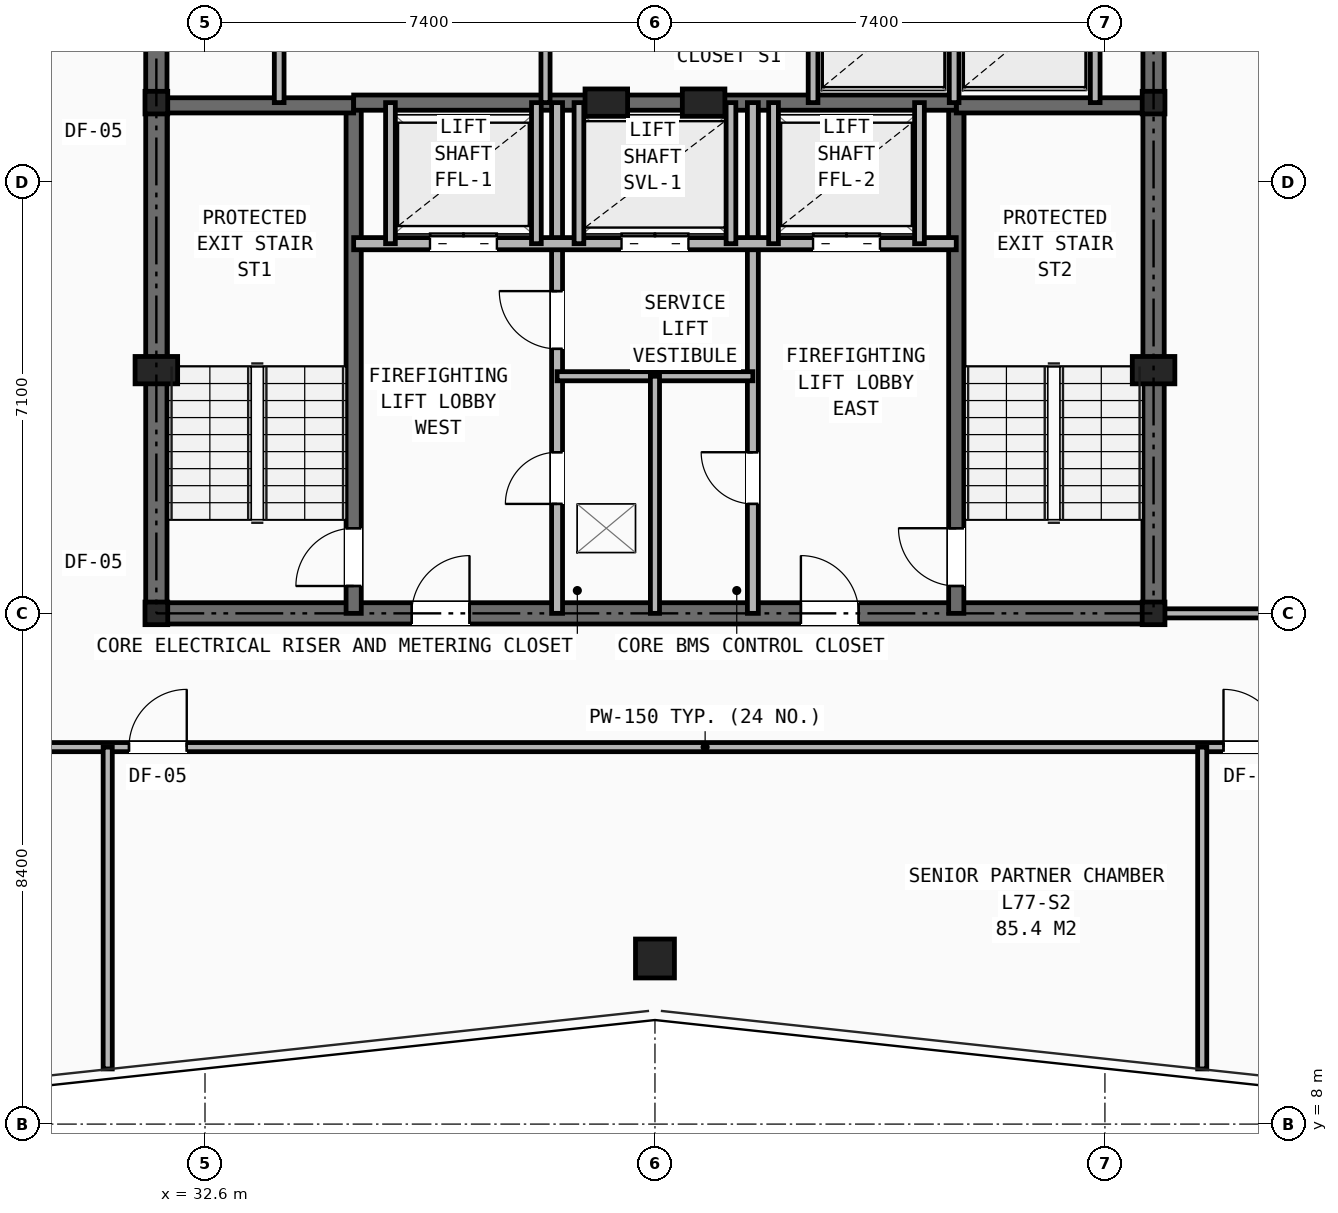
"""IFC4 building model, lengths in metres.
Left out: names, types, materials, properties, quantities, classifications, styles, units other than length and angle.
Written with IfcOpenShell. Run it as: python <this file> out.ifc"""

import sys

from ifc_helpers import new_model, si_unit, direction, frame, frame_2d, origin, origin_2d, place, context, subcontext, project, spatial, rectangle, hollow_rectangle, i_section, extrude, element, fill, save


model = new_model("IFC4")
c1 = context("Model", 3, precision=1e-05, world=origin(), true_north=direction((0.0, 1.0)))
c2 = subcontext(c1, "Body", "Model", "MODEL_VIEW")
j1 = project(units=[si_unit("LENGTHUNIT", "METRE"), si_unit("PLANEANGLEUNIT", "RADIAN")], contexts=[c1])
p1 = place(None, origin())
s1 = spatial("IfcSite", under=j1, at=p1, CompositionType="ELEMENT")
p2 = place(p1, origin())
s2 = spatial("IfcBuilding", under=s1, at=p2, CompositionType="ELEMENT")
p3 = place(p2, frame((0.0, 0.0, 272.5)))
s3 = spatial("IfcBuildingStorey", under=s2, at=p3, CompositionType="ELEMENT", Elevation=272.5)
for number, where, z_axis, x_axis in (
    (1, (31.8, 16.4, 0.0), (0.0, 0.0, 1.0), (1.0, 0.0, 0.0)),
    (2, (48.2, 16.4, 0.0), (0.0, 0.0, 1.0), (1.0, 0.0, 0.0)),
    (3, (31.8, 24.8, 0.0), (0.0, 0.0, 1.0), (1.0, 0.0, 0.0)),
    (4, (48.2, 24.8, 0.0), (0.0, 0.0, 1.0), (1.0, 0.0, 0.0)),
):
    element("IfcColumn", number, at=place(p3, frame(where, z_axis=z_axis, x_axis=x_axis)), inside=s3, PredefinedType="COLUMN", context=c2, shape_type="SweptSolid", body=[
        extrude(i_section(OverallWidth=0.374, OverallDepth=0.372, WebThickness=0.016, FlangeThickness=0.026, at=origin_2d()), origin(), (0.0, 0.0, 1.0), 3.5),
    ])
for number, where, z_axis, x_axis in (
    (5, (31.8, 20.4, 0.0), (0.0, 0.0, 1.0), (1.0, 0.0, 0.0)),
    (6, (48.2, 20.4, 0.0), (0.0, 0.0, 1.0), (1.0, 0.0, 0.0)),
    (7, (39.2, 24.8, 0.0), (0.0, 0.0, 1.0), (1.0, 0.0, 0.0)),
    (8, (40.8, 24.8, 0.0), (0.0, 0.0, 1.0), (1.0, 0.0, 0.0)),
):
    element("IfcColumn", number, at=place(p3, frame(where, z_axis=z_axis, x_axis=x_axis)), inside=s3, PredefinedType="PILASTER", context=c2, shape_type="SweptSolid", body=[
        extrude(rectangle(XDim=0.7, YDim=0.45, at=origin_2d()), origin(), (0.0, 0.0, 1.0), 3.5),
    ])
p4 = place(p3, frame((40.0, 10.724, 0.0), z_axis=(0.0, 0.0, 1.0), x_axis=(1.0, 0.0, 0.0)))
e9 = element("IfcColumn", 9, at=p4, inside=s3, PredefinedType="COLUMN", context=c2, shape_type="SweptSolid", body=[
    extrude(hollow_rectangle(XDim=0.64, YDim=0.64, WallThickness=0.045, at=origin_2d()), origin(), (0.0, 0.0, 1.0), 3.5),
])
p5 = place(p3, frame((31.8, 16.4, 0.0), z_axis=(0.0, 0.0, 1.0), x_axis=(1.0, 0.0, 0.0)))
e10 = element("IfcWall", 10, at=p5, inside=s3, PredefinedType="SHEAR", context=c2, shape_type="SweptSolid", body=[
    extrude(rectangle(XDim=16.4, YDim=0.35, at=frame_2d((8.2, 0.0))), origin(), (0.0, 0.0, 1.0), 3.25),
])
p6 = place(p5, frame((4.2, 0.0, 0.0)))
e11 = element("IfcOpeningElement", 11, at=p6, cuts=e10, PredefinedType="OPENING", context=c2, shape_type="SweptSolid", body=[
    extrude(rectangle(XDim=0.95, YDim=2.1, at=frame_2d((0.475, 1.05))), frame((0.0, 0.185, 0.0), z_axis=(0.0, -1.0, 0.0), x_axis=(1.0, 0.0, 0.0)), (0.0, 0.0, 1.0), 0.37),
])
p7 = place(p5, frame((10.6, 0.0, 0.0)))
e12 = element("IfcOpeningElement", 12, at=p7, cuts=e10, PredefinedType="OPENING", context=c2, shape_type="SweptSolid", body=[
    extrude(rectangle(XDim=0.95, YDim=2.1, at=frame_2d((0.475, 1.05))), frame((0.0, 0.185, 0.0), z_axis=(0.0, -1.0, 0.0), x_axis=(1.0, 0.0, 0.0)), (0.0, 0.0, 1.0), 0.37),
])
p8 = place(p3, frame((31.8, 16.4, 0.0), z_axis=(0.0, 0.0, 1.0), x_axis=(0.0, 1.0, 0.0)))
e13 = element("IfcWall", 13, at=p8, inside=s3, PredefinedType="SHEAR", context=c2, shape_type="SweptSolid", body=[
    extrude(rectangle(XDim=14.8, YDim=0.35, at=frame_2d((7.4, 0.0))), origin(), (0.0, 0.0, 1.0), 3.25),
])
p9 = place(p8, frame((11.0, 0.0, 0.0)))
e14 = element("IfcOpeningElement", 14, at=p9, cuts=e13, PredefinedType="OPENING", context=c2, shape_type="SweptSolid", body=[
    extrude(rectangle(XDim=1.1, YDim=2.15, at=frame_2d((0.55, 1.075))), frame((0.0, 0.185, 0.0), z_axis=(0.0, -1.0, 0.0), x_axis=(1.0, 0.0, 0.0)), (0.0, 0.0, 1.0), 0.37),
])
p10 = place(p3, frame((48.2, 16.4, 0.0), z_axis=(0.0, 0.0, 1.0), x_axis=(0.0, 1.0, 0.0)))
e15 = element("IfcWall", 15, at=p10, inside=s3, PredefinedType="SHEAR", context=c2, shape_type="SweptSolid", body=[
    extrude(rectangle(XDim=14.8, YDim=0.35, at=frame_2d((7.4, 0.0))), origin(), (0.0, 0.0, 1.0), 3.25),
])
p11 = place(p10, frame((11.0, 0.0, 0.0)))
e16 = element("IfcOpeningElement", 16, at=p11, cuts=e15, PredefinedType="OPENING", context=c2, shape_type="SweptSolid", body=[
    extrude(rectangle(XDim=1.1, YDim=2.15, at=frame_2d((0.55, 1.075))), frame((0.0, 0.185, 0.0), z_axis=(0.0, -1.0, 0.0), x_axis=(1.0, 0.0, 0.0)), (0.0, 0.0, 1.0), 0.37),
])
p12 = place(p3, frame((35.045, 16.4, 0.0), z_axis=(0.0, 0.0, 1.0), x_axis=(0.0, 1.0, 0.0)))
e17 = element("IfcWall", 17, at=p12, inside=s3, PredefinedType="SHEAR", context=c2, shape_type="SweptSolid", body=[
    extrude(rectangle(XDim=8.4, YDim=0.25, at=frame_2d((4.2, 0.0))), origin(), (0.0, 0.0, 1.0), 3.25),
])
p13 = place(p12, frame((0.45, 0.0, 0.0)))
e18 = element("IfcOpeningElement", 18, at=p13, cuts=e17, PredefinedType="OPENING", context=c2, shape_type="SweptSolid", body=[
    extrude(rectangle(XDim=0.95, YDim=2.1, at=frame_2d((0.475, 1.05))), frame((0.0, 0.135, 0.0), z_axis=(0.0, -1.0, 0.0), x_axis=(1.0, 0.0, 0.0)), (0.0, 0.0, 1.0), 0.27),
])
p14 = place(p3, frame((31.8, 24.755, 0.0), z_axis=(0.0, 0.0, 1.0), x_axis=(1.0, 0.0, 0.0)))
e19 = element("IfcWall", 19, at=p14, inside=s3, PredefinedType="SHEAR", context=c2, shape_type="SweptSolid", body=[
    extrude(rectangle(XDim=3.245, YDim=0.25, at=frame_2d((1.623, 0.0))), origin(), (0.0, 0.0, 1.0), 3.25),
])
p15 = place(p3, frame((44.955, 16.4, 0.0), z_axis=(0.0, 0.0, 1.0), x_axis=(0.0, 1.0, 0.0)))
e20 = element("IfcWall", 20, at=p15, inside=s3, PredefinedType="SHEAR", context=c2, shape_type="SweptSolid", body=[
    extrude(rectangle(XDim=8.4, YDim=0.25, at=frame_2d((4.2, 0.0))), origin(), (0.0, 0.0, 1.0), 3.25),
])
p16 = place(p15, frame((0.45, 0.0, 0.0)))
e21 = element("IfcOpeningElement", 21, at=p16, cuts=e20, PredefinedType="OPENING", context=c2, shape_type="SweptSolid", body=[
    extrude(rectangle(XDim=0.95, YDim=2.1, at=frame_2d((0.475, 1.05))), frame((0.0, 0.135, 0.0), z_axis=(0.0, -1.0, 0.0), x_axis=(1.0, 0.0, 0.0)), (0.0, 0.0, 1.0), 0.27),
])
p17 = place(p3, frame((44.955, 24.755, 0.0), z_axis=(0.0, 0.0, 1.0), x_axis=(1.0, 0.0, 0.0)))
e22 = element("IfcWall", 22, at=p17, inside=s3, PredefinedType="SHEAR", context=c2, shape_type="SweptSolid", body=[
    extrude(rectangle(XDim=3.245, YDim=0.25, at=frame_2d((1.623, 0.0))), origin(), (0.0, 0.0, 1.0), 3.25),
])
p18 = place(p3, frame((35.045, 24.8, 0.0), z_axis=(0.0, 0.0, 1.0), x_axis=(1.0, 0.0, 0.0)))
e23 = element("IfcWall", 23, at=p18, inside=s3, PredefinedType="SHEAR", context=c2, shape_type="SweptSolid", body=[
    extrude(rectangle(XDim=9.91, YDim=0.25, at=frame_2d((4.955, 0.0))), origin(), (0.0, 0.0, 1.0), 3.25),
])
p19 = place(p3, frame((38.39, 16.4, 0.0), z_axis=(0.0, 0.0, 1.0), x_axis=(0.0, 1.0, 0.0)))
e24 = element("IfcWall", 24, at=p19, inside=s3, PredefinedType="PARTITIONING", context=c2, shape_type="SweptSolid", body=[
    extrude(rectangle(XDim=8.4, YDim=0.18, at=frame_2d((4.2, 0.0))), origin(), (0.0, 0.0, 1.0), 2.705),
])
p20 = place(p19, frame((1.8, 0.0, 0.0)))
e25 = element("IfcOpeningElement", 25, at=p20, cuts=e24, PredefinedType="OPENING", context=c2, shape_type="SweptSolid", body=[
    extrude(rectangle(XDim=0.85, YDim=2.05, at=frame_2d((0.425, 1.025))), frame((0.0, 0.1, 0.0), z_axis=(0.0, -1.0, 0.0), x_axis=(1.0, 0.0, 0.0)), (0.0, 0.0, 1.0), 0.2),
])
p21 = place(p19, frame((4.35, 0.0, 0.0)))
e26 = element("IfcOpeningElement", 26, at=p21, cuts=e24, PredefinedType="OPENING", context=c2, shape_type="SweptSolid", body=[
    extrude(rectangle(XDim=0.95, YDim=2.1, at=frame_2d((0.475, 1.05))), frame((0.0, 0.1, 0.0), z_axis=(0.0, -1.0, 0.0), x_axis=(1.0, 0.0, 0.0)), (0.0, 0.0, 1.0), 0.2),
])
p22 = place(p3, frame((41.61, 16.4, 0.0), z_axis=(0.0, 0.0, 1.0), x_axis=(0.0, 1.0, 0.0)))
e27 = element("IfcWall", 27, at=p22, inside=s3, PredefinedType="PARTITIONING", context=c2, shape_type="SweptSolid", body=[
    extrude(rectangle(XDim=8.4, YDim=0.18, at=frame_2d((4.2, 0.0))), origin(), (0.0, 0.0, 1.0), 2.705),
])
p23 = place(p22, frame((1.8, 0.0, 0.0)))
e28 = element("IfcOpeningElement", 28, at=p23, cuts=e27, PredefinedType="OPENING", context=c2, shape_type="SweptSolid", body=[
    extrude(rectangle(XDim=0.85, YDim=2.05, at=frame_2d((0.425, 1.025))), frame((0.0, 0.1, 0.0), z_axis=(0.0, -1.0, 0.0), x_axis=(1.0, 0.0, 0.0)), (0.0, 0.0, 1.0), 0.2),
])
p24 = place(p3, frame((35.045, 22.48, 0.0), z_axis=(0.0, 0.0, 1.0), x_axis=(1.0, 0.0, 0.0)))
e29 = element("IfcWall", 29, at=p24, inside=s3, PredefinedType="SOLIDWALL", context=c2, shape_type="SweptSolid", body=[
    extrude(rectangle(XDim=9.91, YDim=0.2, at=frame_2d((4.955, 0.0))), origin(), (0.0, 0.0, 1.0), 3.25),
])
p25 = place(p24, frame((1.255, 0.0, 0.0)))
e30 = element("IfcOpeningElement", 30, at=p25, cuts=e29, PredefinedType="OPENING", context=c2, shape_type="SweptSolid", body=[
    extrude(rectangle(XDim=1.1, YDim=2.15, at=frame_2d((0.55, 1.075))), frame((0.0, 0.11, 0.0), z_axis=(0.0, -1.0, 0.0), x_axis=(1.0, 0.0, 0.0)), (0.0, 0.0, 1.0), 0.22),
])
p26 = place(p24, frame((7.555, 0.0, 0.0)))
e31 = element("IfcOpeningElement", 31, at=p26, cuts=e29, PredefinedType="OPENING", context=c2, shape_type="SweptSolid", body=[
    extrude(rectangle(XDim=1.1, YDim=2.15, at=frame_2d((0.55, 1.075))), frame((0.0, 0.11, 0.0), z_axis=(0.0, -1.0, 0.0), x_axis=(1.0, 0.0, 0.0)), (0.0, 0.0, 1.0), 0.22),
])
p27 = place(p24, frame((4.405, 0.0, 0.0)))
e32 = element("IfcOpeningElement", 32, at=p27, cuts=e29, PredefinedType="OPENING", context=c2, shape_type="SweptSolid", body=[
    extrude(rectangle(XDim=1.1, YDim=2.15, at=frame_2d((0.55, 1.075))), frame((0.0, 0.11, 0.0), z_axis=(0.0, -1.0, 0.0), x_axis=(1.0, 0.0, 0.0)), (0.0, 0.0, 1.0), 0.22),
])
p28 = place(p3, frame((38.39, 20.3, 0.0), z_axis=(0.0, 0.0, 1.0), x_axis=(1.0, 0.0, 0.0)))
e33 = element("IfcWall", 33, at=p28, inside=s3, PredefinedType="PARTITIONING", context=c2, shape_type="SweptSolid", body=[
    extrude(rectangle(XDim=3.22, YDim=0.15, at=frame_2d((1.61, 0.0))), origin(), (0.0, 0.0, 1.0), 3.25),
])
p29 = place(p3, frame((40.0, 16.4, 0.0), z_axis=(0.0, 0.0, 1.0), x_axis=(0.0, 1.0, 0.0)))
e34 = element("IfcWall", 34, at=p29, inside=s3, PredefinedType="PARTITIONING", context=c2, shape_type="SweptSolid", body=[
    extrude(rectangle(XDim=3.9, YDim=0.15, at=frame_2d((1.95, 0.0))), origin(), (0.0, 0.0, 1.0), 2.705),
])
for number, where, z_axis, x_axis in (
    (35, (35.65, 22.48, 0.0), (0.0, 0.0, 1.0), (0.0, 1.0, 0.0)),
    (36, (38.05, 22.48, 0.0), (0.0, 0.0, 1.0), (0.0, 1.0, 0.0)),
    (37, (41.95, 22.48, 0.0), (0.0, 0.0, 1.0), (0.0, 1.0, 0.0)),
    (38, (44.35, 22.48, 0.0), (0.0, 0.0, 1.0), (0.0, 1.0, 0.0)),
    (39, (38.75, 22.48, 0.0), (0.0, 0.0, 1.0), (0.0, 1.0, 0.0)),
    (40, (41.25, 22.48, 0.0), (0.0, 0.0, 1.0), (0.0, 1.0, 0.0)),
):
    element("IfcWall", number, at=place(p3, frame(where, z_axis=z_axis, x_axis=x_axis)), inside=s3, PredefinedType="SOLIDWALL", context=c2, shape_type="SweptSolid", body=[
        extrude(rectangle(XDim=2.32, YDim=0.16, at=frame_2d((1.16, 0.0))), origin(), (0.0, 0.0, 1.0), 3.25),
    ])
p30 = place(p3, frame((33.82, 24.8, 0.0), z_axis=(0.0, 0.0, 1.0), x_axis=(0.0, 1.0, 0.0)))
e41 = element("IfcWall", 41, at=p30, inside=s3, PredefinedType="SOLIDWALL", context=c2, shape_type="SweptSolid", body=[
    extrude(rectangle(XDim=2.08, YDim=0.16, at=frame_2d((1.04, 0.0))), origin(), (0.0, 0.0, 1.0), 3.25),
])
p31 = place(p3, frame((38.2, 24.8, 0.0), z_axis=(0.0, 0.0, 1.0), x_axis=(0.0, 1.0, 0.0)))
e42 = element("IfcWall", 42, at=p31, inside=s3, PredefinedType="PARTITIONING", context=c2, shape_type="SweptSolid", body=[
    extrude(rectangle(XDim=2.08, YDim=0.15, at=frame_2d((1.04, 0.0))), origin(), (0.0, 0.0, 1.0), 3.25),
])
for number, where, z_axis, x_axis in (
    (43, (42.6, 24.8, 0.0), (0.0, 0.0, 1.0), (0.0, 1.0, 0.0)),
    (44, (44.92, 24.8, 0.0), (0.0, 0.0, 1.0), (0.0, 1.0, 0.0)),
    (45, (47.24, 24.8, 0.0), (0.0, 0.0, 1.0), (0.0, 1.0, 0.0)),
):
    element("IfcWall", number, at=place(p3, frame(where, z_axis=z_axis, x_axis=x_axis)), inside=s3, PredefinedType="SOLIDWALL", context=c2, shape_type="SweptSolid", body=[
        extrude(rectangle(XDim=2.08, YDim=0.16, at=frame_2d((1.04, 0.0))), origin(), (0.0, 0.0, 1.0), 3.25),
    ])
p32 = place(p3, frame((48.2, 16.4, 0.0), z_axis=(0.0, 0.0, 1.0), x_axis=(1.0, 0.0, 0.0)))
e46 = element("IfcWall", 46, at=p32, inside=s3, PredefinedType="PARTITIONING", context=c2, shape_type="SweptSolid", body=[
    extrude(rectangle(XDim=15.135, YDim=0.15, at=frame_2d((7.568, 0.0))), origin(), (0.0, 0.0, 1.0), 2.265),
])
p33 = place(p3, frame((25.5, 14.2, 0.0), z_axis=(0.0, 0.0, 1.0), x_axis=(1.0, 0.0, 0.0)))
e47 = element("IfcWall", 47, at=p33, inside=s3, PredefinedType="PARTITIONING", context=c2, shape_type="SweptSolid", body=[
    extrude(rectangle(XDim=29.0, YDim=0.15, at=frame_2d((14.5, 0.0))), origin(), (0.0, 0.0, 1.0), 2.265),
])
p34 = place(p33, frame((0.85, 0.0, 0.0)))
e48 = element("IfcOpeningElement", 48, at=p34, cuts=e47, PredefinedType="OPENING", context=c2, shape_type="SweptSolid", body=[
    extrude(rectangle(XDim=0.95, YDim=2.1, at=frame_2d((0.475, 1.05))), frame((0.0, 0.085, 0.0), z_axis=(0.0, -1.0, 0.0), x_axis=(1.0, 0.0, 0.0)), (0.0, 0.0, 1.0), 0.17),
])
p35 = place(p33, frame((5.85, 0.0, 0.0)))
e49 = element("IfcOpeningElement", 49, at=p35, cuts=e47, PredefinedType="OPENING", context=c2, shape_type="SweptSolid", body=[
    extrude(rectangle(XDim=0.95, YDim=2.1, at=frame_2d((0.475, 1.05))), frame((0.0, 0.085, 0.0), z_axis=(0.0, -1.0, 0.0), x_axis=(1.0, 0.0, 0.0)), (0.0, 0.0, 1.0), 0.17),
])
p36 = place(p33, frame((23.85, 0.0, 0.0)))
e50 = element("IfcOpeningElement", 50, at=p36, cuts=e47, PredefinedType="OPENING", context=c2, shape_type="SweptSolid", body=[
    extrude(rectangle(XDim=0.95, YDim=2.1, at=frame_2d((0.475, 1.05))), frame((0.0, 0.085, 0.0), z_axis=(0.0, -1.0, 0.0), x_axis=(1.0, 0.0, 0.0)), (0.0, 0.0, 1.0), 0.17),
])
for number, where, z_axis, x_axis in (
    (51, (31.0, 8.907, 0.0), (0.0, 0.0, 1.0), (0.0, 1.0, 0.0)),
    (52, (49.0, 8.907, 0.0), (0.0, 0.0, 1.0), (0.0, 1.0, 0.0)),
):
    element("IfcWall", number, at=place(p3, frame(where, z_axis=z_axis, x_axis=x_axis)), inside=s3, PredefinedType="PARTITIONING", context=c2, shape_type="SweptSolid", body=[
        extrude(rectangle(XDim=5.293, YDim=0.15, at=frame_2d((2.646, 0.0))), origin(), (0.0, 0.0, 1.0), 2.628),
    ])
p37 = place(p20, origin())
e53 = element("IfcDoor", 53, at=p37, inside=s3, OperationType="SINGLE_SWING_LEFT", PredefinedType="DOOR", context=c2, shape_type="SweptSolid", body=[
    extrude(rectangle(XDim=0.85, YDim=2.05, at=frame_2d((0.425, 1.025))), frame((0.0, 0.025, 0.0), z_axis=(0.0, -1.0, 0.0), x_axis=(1.0, 0.0, 0.0)), (0.0, 0.0, 1.0), 0.05),
])
fill(e25, e53)
p38 = place(p23, origin())
e54 = element("IfcDoor", 54, at=p38, inside=s3, OperationType="SINGLE_SWING_RIGHT", PredefinedType="DOOR", context=c2, shape_type="SweptSolid", body=[
    extrude(rectangle(XDim=0.85, YDim=2.05, at=frame_2d((0.425, 1.025))), frame((0.0, 0.025, 0.0), z_axis=(0.0, -1.0, 0.0), x_axis=(1.0, 0.0, 0.0)), (0.0, 0.0, 1.0), 0.05),
])
fill(e28, e54)
p39 = place(p21, origin())
e55 = element("IfcDoor", 55, at=p39, inside=s3, OperationType="SINGLE_SWING_RIGHT", PredefinedType="DOOR", context=c2, shape_type="SweptSolid", body=[
    extrude(rectangle(XDim=0.95, YDim=2.1, at=frame_2d((0.475, 1.05))), frame((0.0, 0.025, 0.0), z_axis=(0.0, -1.0, 0.0), x_axis=(1.0, 0.0, 0.0)), (0.0, 0.0, 1.0), 0.05),
])
fill(e26, e55)
p40 = place(p13, origin())
e56 = element("IfcDoor", 56, at=p40, inside=s3, OperationType="SINGLE_SWING_LEFT", PredefinedType="DOOR", context=c2, shape_type="SweptSolid", body=[
    extrude(rectangle(XDim=0.95, YDim=2.1, at=frame_2d((0.475, 1.05))), frame((0.0, 0.025, 0.0), z_axis=(0.0, -1.0, 0.0), x_axis=(1.0, 0.0, 0.0)), (0.0, 0.0, 1.0), 0.05),
])
fill(e18, e56)
p41 = place(p16, origin())
e57 = element("IfcDoor", 57, at=p41, inside=s3, OperationType="SINGLE_SWING_RIGHT", PredefinedType="DOOR", context=c2, shape_type="SweptSolid", body=[
    extrude(rectangle(XDim=0.95, YDim=2.1, at=frame_2d((0.475, 1.05))), frame((0.0, 0.025, 0.0), z_axis=(0.0, -1.0, 0.0), x_axis=(1.0, 0.0, 0.0)), (0.0, 0.0, 1.0), 0.05),
])
fill(e21, e57)
p42 = place(p6, origin())
e58 = element("IfcDoor", 58, at=p42, inside=s3, OperationType="SINGLE_SWING_RIGHT", PredefinedType="DOOR", context=c2, shape_type="SweptSolid", body=[
    extrude(rectangle(XDim=0.95, YDim=2.1, at=frame_2d((0.475, 1.05))), frame((0.0, 0.025, 0.0), z_axis=(0.0, -1.0, 0.0), x_axis=(1.0, 0.0, 0.0)), (0.0, 0.0, 1.0), 0.05),
])
fill(e11, e58)
p43 = place(p7, origin())
e59 = element("IfcDoor", 59, at=p43, inside=s3, OperationType="SINGLE_SWING_LEFT", PredefinedType="DOOR", context=c2, shape_type="SweptSolid", body=[
    extrude(rectangle(XDim=0.95, YDim=2.1, at=frame_2d((0.475, 1.05))), frame((0.0, 0.025, 0.0), z_axis=(0.0, -1.0, 0.0), x_axis=(1.0, 0.0, 0.0)), (0.0, 0.0, 1.0), 0.05),
])
fill(e12, e59)
p44 = place(p25, origin())
e60 = element("IfcDoor", 60, at=p44, inside=s3, OperationType="DOUBLE_DOOR_SLIDING", PredefinedType="DOOR", context=c2, shape_type="SweptSolid", body=[
    extrude(rectangle(XDim=1.1, YDim=2.15, at=frame_2d((0.55, 1.075))), frame((0.0, 0.025, 0.0), z_axis=(0.0, -1.0, 0.0), x_axis=(1.0, 0.0, 0.0)), (0.0, 0.0, 1.0), 0.05),
])
fill(e30, e60)
p45 = place(p26, origin())
e61 = element("IfcDoor", 61, at=p45, inside=s3, OperationType="DOUBLE_DOOR_SLIDING", PredefinedType="DOOR", context=c2, shape_type="SweptSolid", body=[
    extrude(rectangle(XDim=1.1, YDim=2.15, at=frame_2d((0.55, 1.075))), frame((0.0, 0.025, 0.0), z_axis=(0.0, -1.0, 0.0), x_axis=(1.0, 0.0, 0.0)), (0.0, 0.0, 1.0), 0.05),
])
fill(e31, e61)
p46 = place(p27, origin())
e62 = element("IfcDoor", 62, at=p46, inside=s3, OperationType="DOUBLE_DOOR_SLIDING", PredefinedType="DOOR", context=c2, shape_type="SweptSolid", body=[
    extrude(rectangle(XDim=1.1, YDim=2.15, at=frame_2d((0.55, 1.075))), frame((0.0, 0.025, 0.0), z_axis=(0.0, -1.0, 0.0), x_axis=(1.0, 0.0, 0.0)), (0.0, 0.0, 1.0), 0.05),
])
fill(e32, e62)
p47 = place(p35, origin())
e63 = element("IfcDoor", 63, at=p47, inside=s3, OperationType="SINGLE_SWING_RIGHT", PredefinedType="DOOR", context=c2, shape_type="SweptSolid", body=[
    extrude(rectangle(XDim=0.95, YDim=2.1, at=frame_2d((0.475, 1.05))), frame((0.0, 0.025, 0.0), z_axis=(0.0, -1.0, 0.0), x_axis=(1.0, 0.0, 0.0)), (0.0, 0.0, 1.0), 0.05),
])
fill(e49, e63)
p48 = place(p36, origin())
e64 = element("IfcDoor", 64, at=p48, inside=s3, OperationType="SINGLE_SWING_LEFT", PredefinedType="DOOR", context=c2, shape_type="SweptSolid", body=[
    extrude(rectangle(XDim=0.95, YDim=2.1, at=frame_2d((0.475, 1.05))), frame((0.0, 0.025, 0.0), z_axis=(0.0, -1.0, 0.0), x_axis=(1.0, 0.0, 0.0)), (0.0, 0.0, 1.0), 0.05),
])
fill(e50, e64)
save(model, sys.argv[1])
